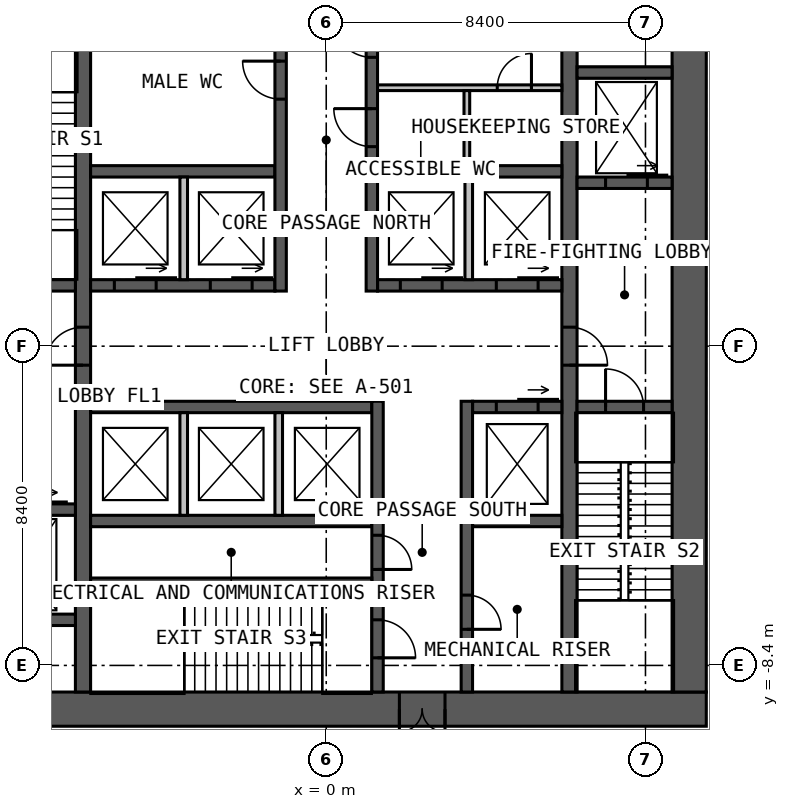
"""IFC4 building model, lengths in metres.
Left out: names, types, materials, properties, quantities, classifications, styles, units other than length and angle.
Written with IfcOpenShell. Run it as: python <this file> out.ifc"""

import sys

from ifc_helpers import new_model, si_unit, direction, frame, frame_2d, origin, place, context, subcontext, project, spatial, rectangle, extrude, element, fill, save


model = new_model("IFC4")
c1 = context("Model", 3, precision=1e-05, world=origin(), true_north=direction((0.0, 1.0)))
c2 = subcontext(c1, "Body", "Model", "MODEL_VIEW")
j1 = project(units=[si_unit("LENGTHUNIT", "METRE"), si_unit("PLANEANGLEUNIT", "RADIAN")], contexts=[c1])
p1 = place(None, origin())
s1 = spatial("IfcSite", under=j1, at=p1, CompositionType="ELEMENT")
p2 = place(p1, origin())
s2 = spatial("IfcBuilding", under=s1, at=p2, CompositionType="ELEMENT")
p3 = place(p2, frame((0.0, 0.0, 16.0)))
s3 = spatial("IfcBuildingStorey", under=s2, at=p3, CompositionType="ELEMENT", Elevation=16.0)
p4 = place(p3, frame((10.0, -9.55, 0.0), z_axis=(0.0, 0.0, 1.0), x_axis=(-1.0, 0.0, 0.0)))
e1 = element("IfcWall", 1, at=p4, inside=s3, PredefinedType="SOLIDWALL", context=c2, shape_type="SweptSolid", body=[
    extrude(rectangle(XDim=20.0, YDim=0.9, at=frame_2d((10.0, 0.0))), origin(), (0.0, 0.0, 1.0), 5.0),
])
p5 = place(p4, frame((6.875, 0.0, 0.0)))
e2 = element("IfcOpeningElement", 2, at=p5, cuts=e1, PredefinedType="OPENING", context=c2, shape_type="SweptSolid", body=[
    extrude(rectangle(XDim=1.2, YDim=2.2, at=frame_2d((0.6, 1.1))), frame((0.0, 0.46, 0.0), z_axis=(0.0, -1.0, 0.0), x_axis=(1.0, 0.0, 0.0)), (0.0, 0.0, 1.0), 0.92),
])
p6 = place(p3, frame((9.55, -9.1, 0.0), z_axis=(0.0, 0.0, 1.0), x_axis=(0.0, 1.0, 0.0)))
e3 = element("IfcWall", 3, at=p6, inside=s3, PredefinedType="SOLIDWALL", context=c2, shape_type="SweptSolid", body=[
    extrude(rectangle(XDim=18.2, YDim=0.9, at=frame_2d((9.1, 0.0))), origin(), (0.0, 0.0, 1.0), 5.0),
])
p7 = place(p3, frame((-6.4, -9.1, 0.0), z_axis=(0.0, 0.0, 1.0), x_axis=(0.0, 1.0, 0.0)))
e4 = element("IfcWall", 4, at=p7, inside=s3, PredefinedType="SOLIDWALL", context=c2, shape_type="SweptSolid", body=[
    extrude(rectangle(XDim=18.2, YDim=0.4, at=frame_2d((9.1, 0.0))), origin(), (0.0, 0.0, 1.0), 5.0),
])
p8 = place(p7, frame((8.6, 0.0, 0.0)))
e5 = element("IfcOpeningElement", 5, at=p8, cuts=e4, PredefinedType="OPENING", context=c2, shape_type="SweptSolid", body=[
    extrude(rectangle(XDim=1.0, YDim=2.2, at=frame_2d((0.5, 1.1))), frame((0.0, 0.21, 0.0), z_axis=(0.0, -1.0, 0.0), x_axis=(1.0, 0.0, 0.0)), (0.0, 0.0, 1.0), 0.42),
])
p9 = place(p3, frame((6.4, 9.1, 0.0), z_axis=(0.0, 0.0, 1.0), x_axis=(0.0, -1.0, 0.0)))
e6 = element("IfcWall", 6, at=p9, inside=s3, PredefinedType="SOLIDWALL", context=c2, shape_type="SweptSolid", body=[
    extrude(rectangle(XDim=18.2, YDim=0.4, at=frame_2d((9.1, 0.0))), origin(), (0.0, 0.0, 1.0), 5.0),
])
p10 = place(p9, frame((8.6, 0.0, 0.0)))
e7 = element("IfcOpeningElement", 7, at=p10, cuts=e6, PredefinedType="OPENING", context=c2, shape_type="SweptSolid", body=[
    extrude(rectangle(XDim=1.0, YDim=2.2, at=frame_2d((0.5, 1.1))), frame((0.0, 0.21, 0.0), z_axis=(0.0, -1.0, 0.0), x_axis=(1.0, 0.0, 0.0)), (0.0, 0.0, 1.0), 0.42),
])
p11 = place(p3, frame((-6.2, 1.6, 0.0), z_axis=(0.0, 0.0, 1.0), x_axis=(1.0, 0.0, 0.0)))
e8 = element("IfcWall", 8, at=p11, inside=s3, PredefinedType="SOLIDWALL", context=c2, shape_type="SweptSolid", body=[
    extrude(rectangle(XDim=4.85, YDim=0.3, at=frame_2d((2.425, 0.0))), origin(), (0.0, 0.0, 1.0), 5.0),
])
p12 = place(p11, frame((0.625, 0.0, 0.0)))
e9 = element("IfcOpeningElement", 9, at=p12, cuts=e8, PredefinedType="OPENING", context=c2, shape_type="SweptSolid", body=[
    extrude(rectangle(XDim=1.1, YDim=2.2, at=frame_2d((0.55, 1.1))), frame((0.0, 0.16, 0.0), z_axis=(0.0, -1.0, 0.0), x_axis=(1.0, 0.0, 0.0)), (0.0, 0.0, 1.0), 0.32),
])
p13 = place(p11, frame((3.15, 0.0, 0.0)))
e10 = element("IfcOpeningElement", 10, at=p13, cuts=e8, PredefinedType="OPENING", context=c2, shape_type="SweptSolid", body=[
    extrude(rectangle(XDim=1.1, YDim=2.2, at=frame_2d((0.55, 1.1))), frame((0.0, 0.16, 0.0), z_axis=(0.0, -1.0, 0.0), x_axis=(1.0, 0.0, 0.0)), (0.0, 0.0, 1.0), 0.32),
])
p14 = place(p3, frame((1.35, 1.6, 0.0), z_axis=(0.0, 0.0, 1.0), x_axis=(1.0, 0.0, 0.0)))
e11 = element("IfcWall", 11, at=p14, inside=s3, PredefinedType="SOLIDWALL", context=c2, shape_type="SweptSolid", body=[
    extrude(rectangle(XDim=4.85, YDim=0.3, at=frame_2d((2.425, 0.0))), origin(), (0.0, 0.0, 1.0), 5.0),
])
p15 = place(p14, frame((0.6, 0.0, 0.0)))
e12 = element("IfcOpeningElement", 12, at=p15, cuts=e11, PredefinedType="OPENING", context=c2, shape_type="SweptSolid", body=[
    extrude(rectangle(XDim=1.1, YDim=2.2, at=frame_2d((0.55, 1.1))), frame((0.0, 0.16, 0.0), z_axis=(0.0, -1.0, 0.0), x_axis=(1.0, 0.0, 0.0)), (0.0, 0.0, 1.0), 0.32),
])
p16 = place(p14, frame((3.125, 0.0, 0.0)))
e13 = element("IfcOpeningElement", 13, at=p16, cuts=e11, PredefinedType="OPENING", context=c2, shape_type="SweptSolid", body=[
    extrude(rectangle(XDim=1.1, YDim=2.2, at=frame_2d((0.55, 1.1))), frame((0.0, 0.16, 0.0), z_axis=(0.0, -1.0, 0.0), x_axis=(1.0, 0.0, 0.0)), (0.0, 0.0, 1.0), 0.32),
])
for number, where, z_axis, x_axis in (
    (14, (-6.2, 4.6, 0.0), (0.0, 0.0, 1.0), (1.0, 0.0, 0.0)),
    (15, (1.35, 4.6, 0.0), (0.0, 0.0, 1.0), (1.0, 0.0, 0.0)),
):
    element("IfcWall", number, at=place(p3, frame(where, z_axis=z_axis, x_axis=x_axis)), inside=s3, PredefinedType="SOLIDWALL", context=c2, shape_type="SweptSolid", body=[
        extrude(rectangle(XDim=4.85, YDim=0.3, at=frame_2d((2.425, 0.0))), origin(), (0.0, 0.0, 1.0), 5.0),
    ])
p17 = place(p3, frame((-1.2, 1.45, 0.0), z_axis=(0.0, 0.0, 1.0), x_axis=(0.0, 1.0, 0.0)))
e16 = element("IfcWall", 16, at=p17, inside=s3, PredefinedType="SOLIDWALL", context=c2, shape_type="SweptSolid", body=[
    extrude(rectangle(XDim=7.65, YDim=0.3, at=frame_2d((3.825, 0.0))), origin(), (0.0, 0.0, 1.0), 5.0),
])
p18 = place(p17, frame((5.05, 0.0, 0.0)))
e17 = element("IfcOpeningElement", 17, at=p18, cuts=e16, PredefinedType="OPENING", context=c2, shape_type="SweptSolid", body=[
    extrude(rectangle(XDim=1.0, YDim=2.2, at=frame_2d((0.5, 1.1))), frame((0.0, 0.16, 0.0), z_axis=(0.0, -1.0, 0.0), x_axis=(1.0, 0.0, 0.0)), (0.0, 0.0, 1.0), 0.32),
])
p19 = place(p3, frame((1.2, 1.45, 0.0), z_axis=(0.0, 0.0, 1.0), x_axis=(0.0, 1.0, 0.0)))
e18 = element("IfcWall", 18, at=p19, inside=s3, PredefinedType="SOLIDWALL", context=c2, shape_type="SweptSolid", body=[
    extrude(rectangle(XDim=7.65, YDim=0.3, at=frame_2d((3.825, 0.0))), origin(), (0.0, 0.0, 1.0), 5.0),
])
p20 = place(p19, frame((3.8, 0.0, 0.0)))
e19 = element("IfcOpeningElement", 19, at=p20, cuts=e18, PredefinedType="OPENING", context=c2, shape_type="SweptSolid", body=[
    extrude(rectangle(XDim=1.0, YDim=2.2, at=frame_2d((0.5, 1.1))), frame((0.0, 0.16, 0.0), z_axis=(0.0, -1.0, 0.0), x_axis=(1.0, 0.0, 0.0)), (0.0, 0.0, 1.0), 0.32),
])
p21 = place(p19, frame((6.15, 0.0, 0.0)))
e20 = element("IfcOpeningElement", 20, at=p21, cuts=e18, PredefinedType="OPENING", context=c2, shape_type="SweptSolid", body=[
    extrude(rectangle(XDim=1.0, YDim=2.2, at=frame_2d((0.5, 1.1))), frame((0.0, 0.16, 0.0), z_axis=(0.0, -1.0, 0.0), x_axis=(1.0, 0.0, 0.0)), (0.0, 0.0, 1.0), 0.32),
])
p22 = place(p3, frame((-6.2, -1.6, 0.0), z_axis=(0.0, 0.0, 1.0), x_axis=(1.0, 0.0, 0.0)))
e21 = element("IfcWall", 21, at=p22, inside=s3, PredefinedType="SOLIDWALL", context=c2, shape_type="SweptSolid", body=[
    extrude(rectangle(XDim=7.4, YDim=0.3, at=frame_2d((3.7, 0.0))), origin(), (0.0, 0.0, 1.0), 5.0),
])
p23 = place(p3, frame((3.85, -1.6, 0.0), z_axis=(0.0, 0.0, 1.0), x_axis=(1.0, 0.0, 0.0)))
e22 = element("IfcWall", 22, at=p23, inside=s3, PredefinedType="SOLIDWALL", context=c2, shape_type="SweptSolid", body=[
    extrude(rectangle(XDim=2.35, YDim=0.3, at=frame_2d((1.175, 0.0))), origin(), (0.0, 0.0, 1.0), 5.0),
])
p24 = place(p23, frame((0.625, 0.0, 0.0)))
e23 = element("IfcOpeningElement", 23, at=p24, cuts=e22, PredefinedType="OPENING", context=c2, shape_type="SweptSolid", body=[
    extrude(rectangle(XDim=1.1, YDim=2.2, at=frame_2d((0.55, 1.1))), frame((0.0, 0.16, 0.0), z_axis=(0.0, -1.0, 0.0), x_axis=(1.0, 0.0, 0.0)), (0.0, 0.0, 1.0), 0.32),
])
p25 = place(p3, frame((-6.2, -4.6, 0.0), z_axis=(0.0, 0.0, 1.0), x_axis=(1.0, 0.0, 0.0)))
e24 = element("IfcWall", 24, at=p25, inside=s3, PredefinedType="SOLIDWALL", context=c2, shape_type="SweptSolid", body=[
    extrude(rectangle(XDim=7.4, YDim=0.3, at=frame_2d((3.7, 0.0))), origin(), (0.0, 0.0, 1.0), 5.0),
])
p26 = place(p3, frame((3.85, -4.6, 0.0), z_axis=(0.0, 0.0, 1.0), x_axis=(1.0, 0.0, 0.0)))
e25 = element("IfcWall", 25, at=p26, inside=s3, PredefinedType="SOLIDWALL", context=c2, shape_type="SweptSolid", body=[
    extrude(rectangle(XDim=2.35, YDim=0.3, at=frame_2d((1.175, 0.0))), origin(), (0.0, 0.0, 1.0), 5.0),
])
p27 = place(p3, frame((1.35, -1.45, 0.0), z_axis=(0.0, 0.0, 1.0), x_axis=(0.0, -1.0, 0.0)))
e26 = element("IfcWall", 26, at=p27, inside=s3, PredefinedType="SOLIDWALL", context=c2, shape_type="SweptSolid", body=[
    extrude(rectangle(XDim=7.65, YDim=0.3, at=frame_2d((3.825, 0.0))), origin(), (0.0, 0.0, 1.0), 5.0),
])
p28 = place(p27, frame((5.75, 0.0, 0.0)))
e27 = element("IfcOpeningElement", 27, at=p28, cuts=e26, PredefinedType="OPENING", context=c2, shape_type="SweptSolid", body=[
    extrude(rectangle(XDim=1.0, YDim=2.2, at=frame_2d((0.5, 1.1))), frame((0.0, 0.16, 0.0), z_axis=(0.0, -1.0, 0.0), x_axis=(1.0, 0.0, 0.0)), (0.0, 0.0, 1.0), 0.32),
])
p29 = place(p27, frame((3.525, 0.0, 0.0)))
e28 = element("IfcOpeningElement", 28, at=p29, cuts=e26, PredefinedType="OPENING", context=c2, shape_type="SweptSolid", body=[
    extrude(rectangle(XDim=0.9, YDim=2.2, at=frame_2d((0.45, 1.1))), frame((0.0, 0.16, 0.0), z_axis=(0.0, -1.0, 0.0), x_axis=(1.0, 0.0, 0.0)), (0.0, 0.0, 1.0), 0.32),
])
p30 = place(p3, frame((3.7, -1.45, 0.0), z_axis=(0.0, 0.0, 1.0), x_axis=(0.0, -1.0, 0.0)))
e29 = element("IfcWall", 29, at=p30, inside=s3, PredefinedType="SOLIDWALL", context=c2, shape_type="SweptSolid", body=[
    extrude(rectangle(XDim=7.65, YDim=0.3, at=frame_2d((3.825, 0.0))), origin(), (0.0, 0.0, 1.0), 5.0),
])
p31 = place(p30, frame((5.1, 0.0, 0.0)))
e30 = element("IfcOpeningElement", 30, at=p31, cuts=e29, PredefinedType="OPENING", context=c2, shape_type="SweptSolid", body=[
    extrude(rectangle(XDim=0.9, YDim=2.2, at=frame_2d((0.45, 1.1))), frame((0.0, 0.16, 0.0), z_axis=(0.0, -1.0, 0.0), x_axis=(1.0, 0.0, 0.0)), (0.0, 0.0, 1.0), 0.32),
])
p32 = place(p3, frame((-6.2, -6.2, 0.0), z_axis=(0.0, 0.0, 1.0), x_axis=(1.0, 0.0, 0.0)))
e31 = element("IfcWall", 31, at=p32, inside=s3, PredefinedType="SOLIDWALL", context=c2, shape_type="SweptSolid", body=[
    extrude(rectangle(XDim=7.4, YDim=0.2, at=frame_2d((3.7, 0.0))), origin(), (0.0, 0.0, 1.0), 5.0),
])
p33 = place(p3, frame((-9.1, 1.6, 0.0), z_axis=(0.0, 0.0, 1.0), x_axis=(1.0, 0.0, 0.0)))
e32 = element("IfcWall", 32, at=p33, inside=s3, PredefinedType="SOLIDWALL", context=c2, shape_type="SweptSolid", body=[
    extrude(rectangle(XDim=2.5, YDim=0.3, at=frame_2d((1.25, 0.0))), origin(), (0.0, 0.0, 1.0), 5.0),
])
p34 = place(p33, frame((0.75, 0.0, 0.0)))
e33 = element("IfcOpeningElement", 33, at=p34, cuts=e32, PredefinedType="OPENING", context=c2, shape_type="SweptSolid", body=[
    extrude(rectangle(XDim=1.0, YDim=2.2, at=frame_2d((0.5, 1.1))), frame((0.0, 0.16, 0.0), z_axis=(0.0, -1.0, 0.0), x_axis=(1.0, 0.0, 0.0)), (0.0, 0.0, 1.0), 0.32),
])
p35 = place(p3, frame((6.6, -1.6, 0.0), z_axis=(0.0, 0.0, 1.0), x_axis=(1.0, 0.0, 0.0)))
e34 = element("IfcWall", 34, at=p35, inside=s3, PredefinedType="SOLIDWALL", context=c2, shape_type="SweptSolid", body=[
    extrude(rectangle(XDim=2.5, YDim=0.3, at=frame_2d((1.25, 0.0))), origin(), (0.0, 0.0, 1.0), 5.0),
])
p36 = place(p35, frame((0.75, 0.0, 0.0)))
e35 = element("IfcOpeningElement", 35, at=p36, cuts=e34, PredefinedType="OPENING", context=c2, shape_type="SweptSolid", body=[
    extrude(rectangle(XDim=1.0, YDim=2.2, at=frame_2d((0.5, 1.1))), frame((0.0, 0.16, 0.0), z_axis=(0.0, -1.0, 0.0), x_axis=(1.0, 0.0, 0.0)), (0.0, 0.0, 1.0), 0.32),
])
p37 = place(p3, frame((-9.1, -4.3, 0.0), z_axis=(0.0, 0.0, 1.0), x_axis=(1.0, 0.0, 0.0)))
e36 = element("IfcWall", 36, at=p37, inside=s3, PredefinedType="SOLIDWALL", context=c2, shape_type="SweptSolid", body=[
    extrude(rectangle(XDim=2.5, YDim=0.3, at=frame_2d((1.25, 0.0))), origin(), (0.0, 0.0, 1.0), 5.0),
])
p38 = place(p37, frame((0.65, 0.0, 0.0)))
e37 = element("IfcOpeningElement", 37, at=p38, cuts=e36, PredefinedType="OPENING", context=c2, shape_type="SweptSolid", body=[
    extrude(rectangle(XDim=1.1, YDim=2.2, at=frame_2d((0.55, 1.1))), frame((0.0, 0.16, 0.0), z_axis=(0.0, -1.0, 0.0), x_axis=(1.0, 0.0, 0.0)), (0.0, 0.0, 1.0), 0.32),
])
p39 = place(p3, frame((6.6, 4.3, 0.0), z_axis=(0.0, 0.0, 1.0), x_axis=(1.0, 0.0, 0.0)))
e38 = element("IfcWall", 38, at=p39, inside=s3, PredefinedType="SOLIDWALL", context=c2, shape_type="SweptSolid", body=[
    extrude(rectangle(XDim=2.5, YDim=0.3, at=frame_2d((1.25, 0.0))), origin(), (0.0, 0.0, 1.0), 5.0),
])
p40 = place(p39, frame((0.75, 0.0, 0.0)))
e39 = element("IfcOpeningElement", 39, at=p40, cuts=e38, PredefinedType="OPENING", context=c2, shape_type="SweptSolid", body=[
    extrude(rectangle(XDim=1.1, YDim=2.2, at=frame_2d((0.55, 1.1))), frame((0.0, 0.16, 0.0), z_axis=(0.0, -1.0, 0.0), x_axis=(1.0, 0.0, 0.0)), (0.0, 0.0, 1.0), 0.32),
])
for number, where, z_axis, x_axis in (
    (40, (-9.1, -7.2, 0.0), (0.0, 0.0, 1.0), (1.0, 0.0, 0.0)),
    (41, (6.6, 7.2, 0.0), (0.0, 0.0, 1.0), (1.0, 0.0, 0.0)),
):
    element("IfcWall", number, at=place(p3, frame(where, z_axis=z_axis, x_axis=x_axis)), inside=s3, PredefinedType="SOLIDWALL", context=c2, shape_type="SweptSolid", body=[
        extrude(rectangle(XDim=2.5, YDim=0.3, at=frame_2d((1.25, 0.0))), origin(), (0.0, 0.0, 1.0), 5.0),
    ])
for number, where, z_axis, x_axis in (
    (42, (-3.75, 1.75, 0.0), (0.0, 0.0, 1.0), (0.0, 1.0, 0.0)),
    (43, (3.75, 1.75, 0.0), (0.0, 0.0, 1.0), (0.0, 1.0, 0.0)),
    (44, (-3.75, -1.75, 0.0), (0.0, 0.0, 1.0), (0.0, -1.0, 0.0)),
    (45, (-1.25, -1.75, 0.0), (0.0, 0.0, 1.0), (0.0, -1.0, 0.0)),
):
    element("IfcWall", number, at=place(p3, frame(where, z_axis=z_axis, x_axis=x_axis)), inside=s3, PredefinedType="SOLIDWALL", context=c2, shape_type="SweptSolid", body=[
        extrude(rectangle(XDim=2.7, YDim=0.2, at=frame_2d((1.35, 0.0))), origin(), (0.0, 0.0, 1.0), 4.75),
    ])
p41 = place(p3, frame((1.35, 6.8, 0.0), z_axis=(0.0, 0.0, 1.0), x_axis=(1.0, 0.0, 0.0)))
e46 = element("IfcWall", 46, at=p41, inside=s3, PredefinedType="PARTITIONING", context=c2, shape_type="SweptSolid", body=[
    extrude(rectangle(XDim=4.85, YDim=0.15, at=frame_2d((2.425, 0.0))), origin(), (0.0, 0.0, 1.0), 4.75),
])
p42 = place(p41, frame((3.15, 0.0, 0.0)))
e47 = element("IfcOpeningElement", 47, at=p42, cuts=e46, PredefinedType="OPENING", context=c2, shape_type="SweptSolid", body=[
    extrude(rectangle(XDim=0.9, YDim=2.2, at=frame_2d((0.45, 1.1))), frame((0.0, 0.085, 0.0), z_axis=(0.0, -1.0, 0.0), x_axis=(1.0, 0.0, 0.0)), (0.0, 0.0, 1.0), 0.17),
])
p43 = place(p3, frame((3.7, 4.75, 0.0), z_axis=(0.0, 0.0, 1.0), x_axis=(0.0, 1.0, 0.0)))
e48 = element("IfcWall", 48, at=p43, inside=s3, PredefinedType="PARTITIONING", context=c2, shape_type="SweptSolid", body=[
    extrude(rectangle(XDim=1.975, YDim=0.15, at=frame_2d((0.988, 0.0))), origin(), (0.0, 0.0, 1.0), 4.75),
])
p44 = place(p5, origin())
e49 = element("IfcDoor", 49, at=p44, inside=s3, OperationType="DOUBLE_DOOR_SINGLE_SWING", PredefinedType="DOOR", context=c2, shape_type="SweptSolid", body=[
    extrude(rectangle(XDim=1.2, YDim=2.2, at=frame_2d((0.6, 1.1))), frame((0.0, 0.025, 0.0), z_axis=(0.0, -1.0, 0.0), x_axis=(1.0, 0.0, 0.0)), (0.0, 0.0, 1.0), 0.05),
])
fill(e2, e49)
p45 = place(p8, origin())
e50 = element("IfcDoor", 50, at=p45, inside=s3, OperationType="SINGLE_SWING_LEFT", PredefinedType="DOOR", context=c2, shape_type="SweptSolid", body=[
    extrude(rectangle(XDim=1.0, YDim=2.2, at=frame_2d((0.5, 1.1))), frame((0.0, 0.025, 0.0), z_axis=(0.0, -1.0, 0.0), x_axis=(1.0, 0.0, 0.0)), (0.0, 0.0, 1.0), 0.05),
])
fill(e5, e50)
p46 = place(p10, origin())
e51 = element("IfcDoor", 51, at=p46, inside=s3, OperationType="SINGLE_SWING_RIGHT", PredefinedType="DOOR", context=c2, shape_type="SweptSolid", body=[
    extrude(rectangle(XDim=1.0, YDim=2.2, at=frame_2d((0.5, 1.1))), frame((0.0, 0.025, 0.0), z_axis=(0.0, -1.0, 0.0), x_axis=(1.0, 0.0, 0.0)), (0.0, 0.0, 1.0), 0.05),
])
fill(e7, e51)
p47 = place(p36, origin())
e52 = element("IfcDoor", 52, at=p47, inside=s3, OperationType="SINGLE_SWING_LEFT", PredefinedType="DOOR", context=c2, shape_type="SweptSolid", body=[
    extrude(rectangle(XDim=1.0, YDim=2.2, at=frame_2d((0.5, 1.1))), frame((0.0, 0.025, 0.0), z_axis=(0.0, -1.0, 0.0), x_axis=(1.0, 0.0, 0.0)), (0.0, 0.0, 1.0), 0.05),
])
fill(e35, e52)
p48 = place(p28, origin())
e53 = element("IfcDoor", 53, at=p48, inside=s3, OperationType="SINGLE_SWING_RIGHT", PredefinedType="DOOR", context=c2, shape_type="SweptSolid", body=[
    extrude(rectangle(XDim=1.0, YDim=2.2, at=frame_2d((0.5, 1.1))), frame((0.0, 0.025, 0.0), z_axis=(0.0, -1.0, 0.0), x_axis=(1.0, 0.0, 0.0)), (0.0, 0.0, 1.0), 0.05),
])
fill(e27, e53)
p49 = place(p18, origin())
e54 = element("IfcDoor", 54, at=p49, inside=s3, OperationType="SINGLE_SWING_RIGHT", PredefinedType="DOOR", context=c2, shape_type="SweptSolid", body=[
    extrude(rectangle(XDim=1.0, YDim=2.2, at=frame_2d((0.5, 1.1))), frame((0.0, 0.025, 0.0), z_axis=(0.0, -1.0, 0.0), x_axis=(1.0, 0.0, 0.0)), (0.0, 0.0, 1.0), 0.05),
])
fill(e17, e54)
p50 = place(p20, origin())
e55 = element("IfcDoor", 55, at=p50, inside=s3, OperationType="SINGLE_SWING_RIGHT", PredefinedType="DOOR", context=c2, shape_type="SweptSolid", body=[
    extrude(rectangle(XDim=1.0, YDim=2.2, at=frame_2d((0.5, 1.1))), frame((0.0, 0.025, 0.0), z_axis=(0.0, -1.0, 0.0), x_axis=(1.0, 0.0, 0.0)), (0.0, 0.0, 1.0), 0.05),
])
fill(e19, e55)
p51 = place(p21, origin())
e56 = element("IfcDoor", 56, at=p51, inside=s3, OperationType="SINGLE_SWING_RIGHT", PredefinedType="DOOR", context=c2, shape_type="SweptSolid", body=[
    extrude(rectangle(XDim=1.0, YDim=2.2, at=frame_2d((0.5, 1.1))), frame((0.0, 0.025, 0.0), z_axis=(0.0, -1.0, 0.0), x_axis=(1.0, 0.0, 0.0)), (0.0, 0.0, 1.0), 0.05),
])
fill(e20, e56)
p52 = place(p29, origin())
e57 = element("IfcDoor", 57, at=p52, inside=s3, OperationType="SINGLE_SWING_RIGHT", PredefinedType="DOOR", context=c2, shape_type="SweptSolid", body=[
    extrude(rectangle(XDim=0.9, YDim=2.2, at=frame_2d((0.45, 1.1))), frame((0.0, 0.025, 0.0), z_axis=(0.0, -1.0, 0.0), x_axis=(1.0, 0.0, 0.0)), (0.0, 0.0, 1.0), 0.05),
])
fill(e28, e57)
p53 = place(p31, origin())
e58 = element("IfcDoor", 58, at=p53, inside=s3, OperationType="SINGLE_SWING_RIGHT", PredefinedType="DOOR", context=c2, shape_type="SweptSolid", body=[
    extrude(rectangle(XDim=0.9, YDim=2.2, at=frame_2d((0.45, 1.1))), frame((0.0, 0.025, 0.0), z_axis=(0.0, -1.0, 0.0), x_axis=(1.0, 0.0, 0.0)), (0.0, 0.0, 1.0), 0.05),
])
fill(e30, e58)
p54 = place(p42, origin())
e59 = element("IfcDoor", 59, at=p54, inside=s3, OperationType="SINGLE_SWING_RIGHT", PredefinedType="DOOR", context=c2, shape_type="SweptSolid", body=[
    extrude(rectangle(XDim=0.9, YDim=2.2, at=frame_2d((0.45, 1.1))), frame((0.0, 0.025, 0.0), z_axis=(0.0, -1.0, 0.0), x_axis=(1.0, 0.0, 0.0)), (0.0, 0.0, 1.0), 0.05),
])
fill(e47, e59)
p55 = place(p12, origin())
e60 = element("IfcDoor", 60, at=p55, inside=s3, OperationType="SLIDING_TO_LEFT", PredefinedType="DOOR", context=c2, shape_type="SweptSolid", body=[
    extrude(rectangle(XDim=1.1, YDim=2.2, at=frame_2d((0.55, 1.1))), frame((0.0, 0.025, 0.0), z_axis=(0.0, -1.0, 0.0), x_axis=(1.0, 0.0, 0.0)), (0.0, 0.0, 1.0), 0.05),
])
fill(e9, e60)
p56 = place(p13, origin())
e61 = element("IfcDoor", 61, at=p56, inside=s3, OperationType="SLIDING_TO_LEFT", PredefinedType="DOOR", context=c2, shape_type="SweptSolid", body=[
    extrude(rectangle(XDim=1.1, YDim=2.2, at=frame_2d((0.55, 1.1))), frame((0.0, 0.025, 0.0), z_axis=(0.0, -1.0, 0.0), x_axis=(1.0, 0.0, 0.0)), (0.0, 0.0, 1.0), 0.05),
])
fill(e10, e61)
p57 = place(p15, origin())
e62 = element("IfcDoor", 62, at=p57, inside=s3, OperationType="SLIDING_TO_LEFT", PredefinedType="DOOR", context=c2, shape_type="SweptSolid", body=[
    extrude(rectangle(XDim=1.1, YDim=2.2, at=frame_2d((0.55, 1.1))), frame((0.0, 0.025, 0.0), z_axis=(0.0, -1.0, 0.0), x_axis=(1.0, 0.0, 0.0)), (0.0, 0.0, 1.0), 0.05),
])
fill(e12, e62)
p58 = place(p16, origin())
e63 = element("IfcDoor", 63, at=p58, inside=s3, OperationType="SLIDING_TO_LEFT", PredefinedType="DOOR", context=c2, shape_type="SweptSolid", body=[
    extrude(rectangle(XDim=1.1, YDim=2.2, at=frame_2d((0.55, 1.1))), frame((0.0, 0.025, 0.0), z_axis=(0.0, -1.0, 0.0), x_axis=(1.0, 0.0, 0.0)), (0.0, 0.0, 1.0), 0.05),
])
fill(e13, e63)
p59 = place(p24, origin())
e64 = element("IfcDoor", 64, at=p59, inside=s3, OperationType="SLIDING_TO_LEFT", PredefinedType="DOOR", context=c2, shape_type="SweptSolid", body=[
    extrude(rectangle(XDim=1.1, YDim=2.2, at=frame_2d((0.55, 1.1))), frame((0.0, 0.025, 0.0), z_axis=(0.0, -1.0, 0.0), x_axis=(1.0, 0.0, 0.0)), (0.0, 0.0, 1.0), 0.05),
])
fill(e23, e64)
p60 = place(p40, origin())
e65 = element("IfcDoor", 65, at=p60, inside=s3, OperationType="SLIDING_TO_LEFT", PredefinedType="DOOR", context=c2, shape_type="SweptSolid", body=[
    extrude(rectangle(XDim=1.1, YDim=2.2, at=frame_2d((0.55, 1.1))), frame((0.0, 0.025, 0.0), z_axis=(0.0, -1.0, 0.0), x_axis=(1.0, 0.0, 0.0)), (0.0, 0.0, 1.0), 0.05),
])
fill(e39, e65)
save(model, sys.argv[1])
